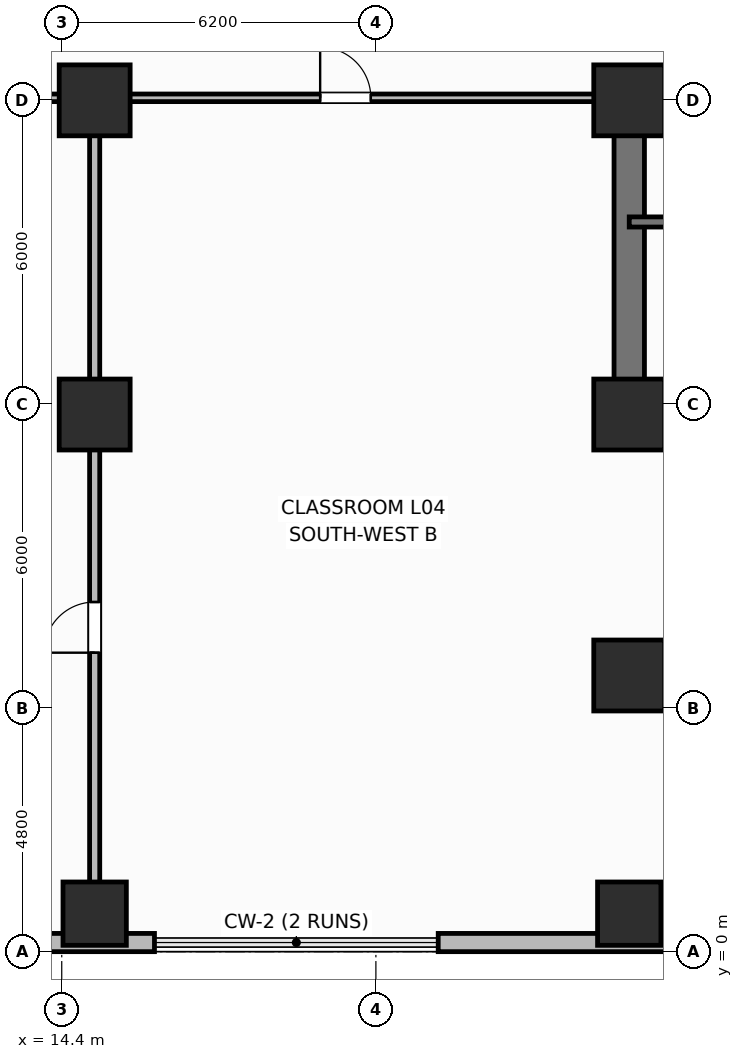
"""IFC4 building model, lengths in metres.
Left out: names, types, materials, properties, quantities, classifications, styles, units other than length and angle.
Written with IfcOpenShell. Run it as: python <this file> out.ifc"""

import sys

from ifc_helpers import new_model, si_unit, direction, frame, frame_2d, origin, origin_2d, place, context, subcontext, project, spatial, rectangle, extrude, element, fill, save


model = new_model("IFC4")
c1 = context("Model", 3, precision=1e-05, world=origin(), true_north=direction((0.0, 1.0)))
c2 = subcontext(c1, "Body", "Model", "MODEL_VIEW")
j1 = project(units=[si_unit("LENGTHUNIT", "METRE"), si_unit("PLANEANGLEUNIT", "RADIAN")], contexts=[c1])
p1 = place(None, origin())
s1 = spatial("IfcSite", under=j1, at=p1, CompositionType="ELEMENT")
p2 = place(p1, origin())
s2 = spatial("IfcBuilding", under=s1, at=p2, CompositionType="ELEMENT")
p3 = place(p2, frame((0.0, 0.0, 20.1)))
s3 = spatial("IfcBuildingStorey", under=s2, at=p3, CompositionType="ELEMENT", Elevation=20.1)
p4 = place(p3, frame((52.8, 10.6, 0.0), z_axis=(0.0, 0.0, 1.0), x_axis=(-1.0, 0.0, 0.0)))
e1 = element("IfcWall", 1, at=p4, inside=s3, PredefinedType="SHEAR", context=c2, shape_type="SweptSolid", body=[
    extrude(rectangle(XDim=27.2, YDim=0.6, at=frame_2d((13.6, 0.0))), origin(), (0.0, 0.0, 1.0), 4.5),
])
p5 = place(p3, frame((25.6, 10.9, 0.0), z_axis=(0.0, 0.0, 1.0), x_axis=(0.0, 1.0, 0.0)))
e2 = element("IfcWall", 2, at=p5, inside=s3, PredefinedType="SHEAR", context=c2, shape_type="SweptSolid", body=[
    extrude(rectangle(XDim=5.6, YDim=0.6, at=frame_2d((2.8, 0.0))), origin(), (0.0, 0.0, 1.0), 4.5),
])
p6 = place(p3, frame((25.6, 16.8, 0.0), z_axis=(0.0, 0.0, 1.0), x_axis=(1.0, 0.0, 0.0)))
e3 = element("IfcWall", 3, at=p6, inside=s3, PredefinedType="SHEAR", context=c2, shape_type="SweptSolid", body=[
    extrude(rectangle(XDim=27.2, YDim=0.6, at=frame_2d((13.6, 0.0))), origin(), (0.0, 0.0, 1.0), 4.5),
])
p7 = place(p6, frame((1.8, 0.0, 0.0)))
e4 = element("IfcOpeningElement", 4, at=p7, cuts=e3, PredefinedType="OPENING", context=c2, shape_type="SweptSolid", body=[
    extrude(rectangle(XDim=1.1, YDim=2.15, at=frame_2d((0.55, 1.075))), frame((0.0, 0.31, 0.0), z_axis=(0.0, -1.0, 0.0), x_axis=(1.0, 0.0, 0.0)), (0.0, 0.0, 1.0), 0.62),
])
p8 = place(p6, frame((5.6, 0.0, 0.0)))
e5 = element("IfcOpeningElement", 5, at=p8, cuts=e3, PredefinedType="OPENING", context=c2, shape_type="SweptSolid", body=[
    extrude(rectangle(XDim=0.85, YDim=2.1, at=frame_2d((0.425, 1.05))), frame((0.0, 0.31, 0.0), z_axis=(0.0, -1.0, 0.0), x_axis=(1.0, 0.0, 0.0)), (0.0, 0.0, 1.0), 0.62),
])
p9 = place(p6, frame((13.0, 0.0, 0.0)))
e6 = element("IfcOpeningElement", 6, at=p9, cuts=e3, PredefinedType="OPENING", context=c2, shape_type="SweptSolid", body=[
    extrude(rectangle(XDim=1.2, YDim=2.15, at=frame_2d((0.6, 1.075))), frame((0.0, 0.31, 0.0), z_axis=(0.0, -1.0, 0.0), x_axis=(1.0, 0.0, 0.0)), (0.0, 0.0, 1.0), 0.62),
])
p10 = place(p6, frame((20.4, 0.0, 0.0)))
e7 = element("IfcOpeningElement", 7, at=p10, cuts=e3, PredefinedType="OPENING", context=c2, shape_type="SweptSolid", body=[
    extrude(rectangle(XDim=1.3, YDim=2.2, at=frame_2d((0.65, 1.1))), frame((0.0, 0.31, 0.0), z_axis=(0.0, -1.0, 0.0), x_axis=(1.0, 0.0, 0.0)), (0.0, 0.0, 1.0), 0.62),
])
p11 = place(p6, frame((24.65, 0.0, 0.0)))
e8 = element("IfcOpeningElement", 8, at=p11, cuts=e3, PredefinedType="OPENING", context=c2, shape_type="SweptSolid", body=[
    extrude(rectangle(XDim=0.85, YDim=2.1, at=frame_2d((0.425, 1.05))), frame((0.0, 0.31, 0.0), z_axis=(0.0, -1.0, 0.0), x_axis=(1.0, 0.0, 0.0)), (0.0, 0.0, 1.0), 0.62),
])
for number, where, z_axis, x_axis in (
    (9, (25.6, 10.6, 0.0), (0.0, 0.0, 1.0), (1.0, 0.0, 0.0)),
    (10, (25.6, 16.8, 0.0), (0.0, 0.0, 1.0), (1.0, 0.0, 0.0)),
):
    element("IfcColumn", number, at=place(p3, frame(where, z_axis=z_axis, x_axis=x_axis)), inside=s3, PredefinedType="COLUMN", context=c2, shape_type="SweptSolid", body=[
        extrude(rectangle(XDim=1.4, YDim=1.4, at=origin_2d()), origin(), (0.0, 0.0, 1.0), 4.5),
    ])
for number, where, z_axis, x_axis in (
    (11, (15.05, 0.75, 0.0), (0.0, 0.0, 1.0), (1.0, 0.0, 0.0)),
    (12, (25.6, 0.75, 0.0), (0.0, 0.0, 1.0), (1.0, 0.0, 0.0)),
):
    element("IfcColumn", number, at=place(p3, frame(where, z_axis=z_axis, x_axis=x_axis)), inside=s3, PredefinedType="COLUMN", context=c2, shape_type="SweptSolid", body=[
        extrude(rectangle(XDim=1.25, YDim=1.25, at=origin_2d()), origin(), (0.0, 0.0, 1.0), 4.5),
    ])
for number, where, z_axis, x_axis in (
    (13, (25.6, 5.45, 0.0), (0.0, 0.0, 1.0), (1.0, 0.0, 0.0)),
    (14, (15.05, 10.6, 0.0), (0.0, 0.0, 1.0), (1.0, 0.0, 0.0)),
    (15, (15.05, 16.8, 0.0), (0.0, 0.0, 1.0), (1.0, 0.0, 0.0)),
):
    element("IfcColumn", number, at=place(p3, frame(where, z_axis=z_axis, x_axis=x_axis)), inside=s3, PredefinedType="COLUMN", context=c2, shape_type="SweptSolid", body=[
        extrude(rectangle(XDim=1.4, YDim=1.4, at=origin_2d()), origin(), (0.0, 0.0, 1.0), 4.5),
    ])
p12 = place(p3, frame((0.98, 0.18, 0.0), z_axis=(0.0, 0.0, 1.0), x_axis=(1.0, 0.0, 0.0)))
e16 = element("IfcWall", 16, at=p12, inside=s3, PredefinedType="SOLIDWALL", context=c2, shape_type="SweptSolid", body=[
    extrude(rectangle(XDim=15.25, YDim=0.36, at=frame_2d((7.625, 0.0))), origin(), (0.0, 0.0, 1.0), 2.3),
])
p13 = place(p12, frame((1.925, 0.0, 0.3)))
e17 = element("IfcOpeningElement", 17, at=p13, cuts=e16, PredefinedType="OPENING", context=c2, shape_type="SweptSolid", body=[
    extrude(rectangle(XDim=2.1, YDim=2.2, at=frame_2d((1.05, 1.1))), frame((0.0, 0.19, 0.0), z_axis=(0.0, -1.0, 0.0), x_axis=(1.0, 0.0, 0.0)), (0.0, 0.0, 1.0), 0.38),
])
p14 = place(p12, frame((7.625, 0.0, 0.3)))
e18 = element("IfcOpeningElement", 18, at=p14, cuts=e16, PredefinedType="OPENING", context=c2, shape_type="SweptSolid", body=[
    extrude(rectangle(XDim=2.1, YDim=2.2, at=frame_2d((1.05, 1.1))), frame((0.0, 0.19, 0.0), z_axis=(0.0, -1.0, 0.0), x_axis=(1.0, 0.0, 0.0)), (0.0, 0.0, 1.0), 0.38),
])
p15 = place(p12, frame((10.525, 0.0, 0.3)))
e19 = element("IfcOpeningElement", 19, at=p15, cuts=e16, PredefinedType="OPENING", context=c2, shape_type="SweptSolid", body=[
    extrude(rectangle(XDim=2.1, YDim=2.2, at=frame_2d((1.05, 1.1))), frame((0.0, 0.19, 0.0), z_axis=(0.0, -1.0, 0.0), x_axis=(1.0, 0.0, 0.0)), (0.0, 0.0, 1.0), 0.38),
])
p16 = place(p3, frame((21.83, 0.18, 0.0), z_axis=(0.0, 0.0, 1.0), x_axis=(1.0, 0.0, 0.0)))
e20 = element("IfcWall", 20, at=p16, inside=s3, PredefinedType="SOLIDWALL", context=c2, shape_type="SweptSolid", body=[
    extrude(rectangle(XDim=55.59, YDim=0.36, at=frame_2d((27.795, 0.0))), origin(), (0.0, 0.0, 1.0), 2.3),
])
p17 = place(p16, frame((5.029, 0.0, 0.3)))
e21 = element("IfcOpeningElement", 21, at=p17, cuts=e20, PredefinedType="OPENING", context=c2, shape_type="SweptSolid", body=[
    extrude(rectangle(XDim=2.1, YDim=2.2, at=frame_2d((1.05, 1.1))), frame((0.0, 0.19, 0.0), z_axis=(0.0, -1.0, 0.0), x_axis=(1.0, 0.0, 0.0)), (0.0, 0.0, 1.0), 0.38),
])
p18 = place(p16, frame((8.648, 0.0, 0.3)))
e22 = element("IfcOpeningElement", 22, at=p18, cuts=e20, PredefinedType="OPENING", context=c2, shape_type="SweptSolid", body=[
    extrude(rectangle(XDim=2.1, YDim=2.2, at=frame_2d((1.05, 1.1))), frame((0.0, 0.19, 0.0), z_axis=(0.0, -1.0, 0.0), x_axis=(1.0, 0.0, 0.0)), (0.0, 0.0, 1.0), 0.38),
])
p19 = place(p16, frame((12.268, 0.0, 0.3)))
e23 = element("IfcOpeningElement", 23, at=p19, cuts=e20, PredefinedType="OPENING", context=c2, shape_type="SweptSolid", body=[
    extrude(rectangle(XDim=2.1, YDim=2.2, at=frame_2d((1.05, 1.1))), frame((0.0, 0.19, 0.0), z_axis=(0.0, -1.0, 0.0), x_axis=(1.0, 0.0, 0.0)), (0.0, 0.0, 1.0), 0.38),
])
p20 = place(p16, frame((19.506, 0.0, 0.3)))
e24 = element("IfcOpeningElement", 24, at=p20, cuts=e20, PredefinedType="OPENING", context=c2, shape_type="SweptSolid", body=[
    extrude(rectangle(XDim=2.1, YDim=2.2, at=frame_2d((1.05, 1.1))), frame((0.0, 0.19, 0.0), z_axis=(0.0, -1.0, 0.0), x_axis=(1.0, 0.0, 0.0)), (0.0, 0.0, 1.0), 0.38),
])
p21 = place(p16, frame((23.126, 0.0, 0.3)))
e25 = element("IfcOpeningElement", 25, at=p21, cuts=e20, PredefinedType="OPENING", context=c2, shape_type="SweptSolid", body=[
    extrude(rectangle(XDim=2.1, YDim=2.2, at=frame_2d((1.05, 1.1))), frame((0.0, 0.19, 0.0), z_axis=(0.0, -1.0, 0.0), x_axis=(1.0, 0.0, 0.0)), (0.0, 0.0, 1.0), 0.38),
])
p22 = place(p16, frame((26.745, 0.0, 0.3)))
e26 = element("IfcOpeningElement", 26, at=p22, cuts=e20, PredefinedType="OPENING", context=c2, shape_type="SweptSolid", body=[
    extrude(rectangle(XDim=2.1, YDim=2.2, at=frame_2d((1.05, 1.1))), frame((0.0, 0.19, 0.0), z_axis=(0.0, -1.0, 0.0), x_axis=(1.0, 0.0, 0.0)), (0.0, 0.0, 1.0), 0.38),
])
p23 = place(p16, frame((33.984, 0.0, 0.3)))
e27 = element("IfcOpeningElement", 27, at=p23, cuts=e20, PredefinedType="OPENING", context=c2, shape_type="SweptSolid", body=[
    extrude(rectangle(XDim=2.1, YDim=2.2, at=frame_2d((1.05, 1.1))), frame((0.0, 0.19, 0.0), z_axis=(0.0, -1.0, 0.0), x_axis=(1.0, 0.0, 0.0)), (0.0, 0.0, 1.0), 0.38),
])
p24 = place(p16, frame((37.603, 0.0, 0.3)))
e28 = element("IfcOpeningElement", 28, at=p24, cuts=e20, PredefinedType="OPENING", context=c2, shape_type="SweptSolid", body=[
    extrude(rectangle(XDim=2.1, YDim=2.2, at=frame_2d((1.05, 1.1))), frame((0.0, 0.19, 0.0), z_axis=(0.0, -1.0, 0.0), x_axis=(1.0, 0.0, 0.0)), (0.0, 0.0, 1.0), 0.38),
])
p25 = place(p16, frame((44.842, 0.0, 0.3)))
e29 = element("IfcOpeningElement", 29, at=p25, cuts=e20, PredefinedType="OPENING", context=c2, shape_type="SweptSolid", body=[
    extrude(rectangle(XDim=2.1, YDim=2.2, at=frame_2d((1.05, 1.1))), frame((0.0, 0.19, 0.0), z_axis=(0.0, -1.0, 0.0), x_axis=(1.0, 0.0, 0.0)), (0.0, 0.0, 1.0), 0.38),
])
p26 = place(p16, frame((52.08, 0.0, 0.3)))
e30 = element("IfcOpeningElement", 30, at=p26, cuts=e20, PredefinedType="OPENING", context=c2, shape_type="SweptSolid", body=[
    extrude(rectangle(XDim=2.1, YDim=2.2, at=frame_2d((1.05, 1.1))), frame((0.0, 0.19, 0.0), z_axis=(0.0, -1.0, 0.0), x_axis=(1.0, 0.0, 0.0)), (0.0, 0.0, 1.0), 0.38),
])
p27 = place(p3, frame((25.6, 14.4, 0.0), z_axis=(0.0, 0.0, 1.0), x_axis=(1.0, 0.0, 0.0)))
e31 = element("IfcWall", 31, at=p27, inside=s3, PredefinedType="SHEAR", context=c2, shape_type="SweptSolid", body=[
    extrude(rectangle(XDim=9.55, YDim=0.2, at=frame_2d((4.775, 0.0))), origin(), (0.0, 0.0, 1.0), 4.5),
])
p28 = place(p27, frame((1.05, 0.0, 0.0)))
e32 = element("IfcOpeningElement", 32, at=p28, cuts=e31, PredefinedType="OPENING", context=c2, shape_type="SweptSolid", body=[
    extrude(rectangle(XDim=1.1, YDim=2.15, at=frame_2d((0.55, 1.075))), frame((0.0, 0.11, 0.0), z_axis=(0.0, -1.0, 0.0), x_axis=(1.0, 0.0, 0.0)), (0.0, 0.0, 1.0), 0.22),
])
p29 = place(p3, frame((15.05, 0.4, 0.0), z_axis=(0.0, 0.0, 1.0), x_axis=(0.0, 1.0, 0.0)))
e33 = element("IfcWall", 33, at=p29, inside=s3, PredefinedType="PARTITIONING", context=c2, shape_type="SweptSolid", body=[
    extrude(rectangle(XDim=16.4, YDim=0.2, at=frame_2d((8.2, 0.0))), origin(), (0.0, 0.0, 1.0), 2.26),
])
p30 = place(p29, frame((5.5, 0.0, 0.0)))
e34 = element("IfcOpeningElement", 34, at=p30, cuts=e33, PredefinedType="OPENING", context=c2, shape_type="SweptSolid", body=[
    extrude(rectangle(XDim=1.0, YDim=2.15, at=frame_2d((0.5, 1.075))), frame((0.0, 0.11, 0.0), z_axis=(0.0, -1.0, 0.0), x_axis=(1.0, 0.0, 0.0)), (0.0, 0.0, 1.0), 0.22),
])
p31 = place(p3, frame((12.0, 16.85, 0.0), z_axis=(0.0, 0.0, 1.0), x_axis=(1.0, 0.0, 0.0)))
e35 = element("IfcWall", 35, at=p31, inside=s3, PredefinedType="PARTITIONING", context=c2, shape_type="SweptSolid", body=[
    extrude(rectangle(XDim=13.25, YDim=0.15, at=frame_2d((6.625, 0.0))), origin(), (0.0, 0.0, 1.0), 2.26),
])
p32 = place(p31, frame((7.5, 0.0, 0.0)))
e36 = element("IfcOpeningElement", 36, at=p32, cuts=e35, PredefinedType="OPENING", context=c2, shape_type="SweptSolid", body=[
    extrude(rectangle(XDim=1.0, YDim=2.15, at=frame_2d((0.5, 1.075))), frame((0.0, 0.085, 0.0), z_axis=(0.0, -1.0, 0.0), x_axis=(1.0, 0.0, 0.0)), (0.0, 0.0, 1.0), 0.17),
])
p33 = place(p30, origin())
e37 = element("IfcDoor", 37, at=p33, inside=s3, OperationType="SINGLE_SWING_LEFT", PredefinedType="DOOR", context=c2, shape_type="SweptSolid", body=[
    extrude(rectangle(XDim=1.0, YDim=2.15, at=frame_2d((0.5, 1.075))), frame((0.0, 0.025, 0.0), z_axis=(0.0, -1.0, 0.0), x_axis=(1.0, 0.0, 0.0)), (0.0, 0.0, 1.0), 0.05),
])
fill(e34, e37)
p34 = place(p32, origin())
e38 = element("IfcDoor", 38, at=p34, inside=s3, OperationType="SINGLE_SWING_LEFT", PredefinedType="DOOR", context=c2, shape_type="SweptSolid", body=[
    extrude(rectangle(XDim=1.0, YDim=2.15, at=frame_2d((0.5, 1.075))), frame((0.0, 0.025, 0.0), z_axis=(0.0, -1.0, 0.0), x_axis=(1.0, 0.0, 0.0)), (0.0, 0.0, 1.0), 0.05),
])
fill(e36, e38)
save(model, sys.argv[1])
